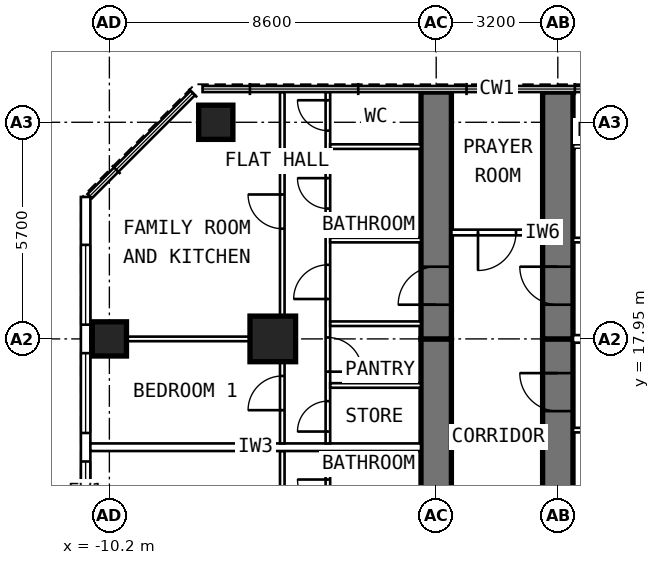
"""IFC4 building model, lengths in metres.
Left out: names, types, materials, properties, quantities, classifications, styles, units other than length and angle.
Written with IfcOpenShell. Run it as: python <this file> out.ifc"""

import sys

from ifc_helpers import new_model, si_unit, direction, frame, frame_2d, origin, origin_2d, place, context, subcontext, project, spatial, rectangle, extrude, element, fill, save


model = new_model("IFC4")
c1 = context("Model", 3, precision=1e-05, world=origin(), true_north=direction((0.0, 1.0)))
c2 = subcontext(c1, "Body", "Model", "MODEL_VIEW")
j1 = project(units=[si_unit("LENGTHUNIT", "METRE"), si_unit("PLANEANGLEUNIT", "RADIAN")], contexts=[c1])
p1 = place(None, origin())
s1 = spatial("IfcSite", under=j1, at=p1, CompositionType="ELEMENT")
p2 = place(p1, origin())
s2 = spatial("IfcBuilding", under=s1, at=p2, CompositionType="ELEMENT")
p3 = place(p2, frame((0.0, 0.0, 134.6)))
s3 = spatial("IfcBuildingStorey", under=s2, at=p3, CompositionType="ELEMENT", Elevation=134.6)
for number, where, z_axis, x_axis in (
    (1, (-10.2, 17.95, 0.0), (0.0, 0.0, 1.0), (0.0, 1.0, 0.0)),
    (2, (-7.4, 23.65, 0.0), (0.0, 0.0, 1.0), (0.0, 1.0, 0.0)),
):
    element("IfcColumn", number, at=place(p3, frame(where, z_axis=z_axis, x_axis=x_axis)), inside=s3, PredefinedType="COLUMN", context=c2, shape_type="SweptSolid", body=[
        extrude(rectangle(XDim=0.9, YDim=0.9, at=origin_2d()), origin(), (0.0, 0.0, 1.0), 3.6),
    ])
p4 = place(p3, frame((-5.9, 17.95, 0.0), z_axis=(0.0, 0.0, 1.0), x_axis=(0.0, 1.0, 0.0)))
e3 = element("IfcColumn", 3, at=p4, inside=s3, PredefinedType="COLUMN", context=c2, shape_type="SweptSolid", body=[
    extrude(rectangle(XDim=1.2, YDim=1.2, at=origin_2d()), origin(), (0.0, 0.0, 1.0), 3.6),
])
p5 = place(p3, frame((-1.6, 9.6, 0.0), z_axis=(0.0, 0.0, 1.0), x_axis=(0.0, 1.0, 0.0)))
e4 = element("IfcWall", 4, at=p5, inside=s3, PredefinedType="SHEAR", context=c2, shape_type="SweptSolid", body=[
    extrude(rectangle(XDim=8.35, YDim=0.8, at=frame_2d((4.175, 0.0))), origin(), (0.0, 0.0, 1.0), 3.6),
])
p6 = place(p5, frame((1.3, 0.0, 0.0)))
e5 = element("IfcOpeningElement", 5, at=p6, cuts=e4, PredefinedType="OPENING", context=c2, shape_type="SweptSolid", body=[
    extrude(rectangle(XDim=1.0, YDim=2.1, at=frame_2d((0.5, 1.05))), frame((0.0, 0.412, 0.0), z_axis=(0.0, -1.0, 0.0), x_axis=(1.0, 0.0, 0.0)), (0.0, 0.0, 1.0), 0.824),
])
p7 = place(p3, frame((-1.6, 17.95, 0.0), z_axis=(0.0, 0.0, 1.0), x_axis=(0.0, 1.0, 0.0)))
e6 = element("IfcWall", 6, at=p7, inside=s3, PredefinedType="SHEAR", context=c2, shape_type="SweptSolid", body=[
    extrude(rectangle(XDim=6.495, YDim=0.8, at=frame_2d((3.248, 0.0))), origin(), (0.0, 0.0, 1.0), 3.6),
])
p8 = place(p7, frame((0.9, 0.0, 0.0)))
e7 = element("IfcOpeningElement", 7, at=p8, cuts=e6, PredefinedType="OPENING", context=c2, shape_type="SweptSolid", body=[
    extrude(rectangle(XDim=1.0, YDim=2.1, at=frame_2d((0.5, 1.05))), frame((0.0, 0.412, 0.0), z_axis=(0.0, -1.0, 0.0), x_axis=(1.0, 0.0, 0.0)), (0.0, 0.0, 1.0), 0.824),
])
p9 = place(p3, frame((1.6, 9.6, 0.0), z_axis=(0.0, 0.0, 1.0), x_axis=(0.0, 1.0, 0.0)))
e8 = element("IfcWall", 8, at=p9, inside=s3, PredefinedType="SHEAR", context=c2, shape_type="SweptSolid", body=[
    extrude(rectangle(XDim=8.35, YDim=0.8, at=frame_2d((4.175, 0.0))), origin(), (0.0, 0.0, 1.0), 3.6),
])
p10 = place(p9, frame((6.45, 0.0, 0.0)))
e9 = element("IfcOpeningElement", 9, at=p10, cuts=e8, PredefinedType="OPENING", context=c2, shape_type="SweptSolid", body=[
    extrude(rectangle(XDim=1.0, YDim=2.1, at=frame_2d((0.5, 1.05))), frame((0.0, 0.412, 0.0), z_axis=(0.0, -1.0, 0.0), x_axis=(1.0, 0.0, 0.0)), (0.0, 0.0, 1.0), 0.824),
])
p11 = place(p3, frame((1.6, 17.95, 0.0), z_axis=(0.0, 0.0, 1.0), x_axis=(0.0, 1.0, 0.0)))
e10 = element("IfcWall", 10, at=p11, inside=s3, PredefinedType="SHEAR", context=c2, shape_type="SweptSolid", body=[
    extrude(rectangle(XDim=6.495, YDim=0.8, at=frame_2d((3.248, 0.0))), origin(), (0.0, 0.0, 1.0), 3.6),
])
p12 = place(p11, frame((0.9, 0.0, 0.0)))
e11 = element("IfcOpeningElement", 11, at=p12, cuts=e10, PredefinedType="OPENING", context=c2, shape_type="SweptSolid", body=[
    extrude(rectangle(XDim=1.0, YDim=2.1, at=frame_2d((0.5, 1.05))), frame((0.0, 0.412, 0.0), z_axis=(0.0, -1.0, 0.0), x_axis=(1.0, 0.0, 0.0)), (0.0, 0.0, 1.0), 0.824),
])
p13 = place(p3, frame((-10.825, 6.148, 0.0), z_axis=(0.0, 0.0, 1.0), x_axis=(0.0, 1.0, 0.0)))
e12 = element("IfcWall", 12, at=p13, inside=s3, PredefinedType="SOLIDWALL", context=c2, shape_type="SweptSolid", body=[
    extrude(rectangle(XDim=15.537, YDim=0.25, at=frame_2d((7.769, 0.0))), origin(), (0.0, 0.0, 1.0), 3.35),
])
p14 = place(p13, frame((0.777, 0.0, 0.8)))
e13 = element("IfcOpeningElement", 13, at=p14, cuts=e12, PredefinedType="OPENING", context=c2, shape_type="SweptSolid", body=[
    extrude(rectangle(XDim=2.1, YDim=1.8, at=frame_2d((1.05, 0.9))), frame((0.0, 0.137, 0.0), z_axis=(0.0, -1.0, 0.0), x_axis=(1.0, 0.0, 0.0)), (0.0, 0.0, 1.0), 0.274),
])
p15 = place(p13, frame((3.627, 0.0, 0.8)))
e14 = element("IfcOpeningElement", 14, at=p15, cuts=e12, PredefinedType="OPENING", context=c2, shape_type="SweptSolid", body=[
    extrude(rectangle(XDim=2.1, YDim=1.8, at=frame_2d((1.05, 0.9))), frame((0.0, 0.137, 0.0), z_axis=(0.0, -1.0, 0.0), x_axis=(1.0, 0.0, 0.0)), (0.0, 0.0, 1.0), 0.274),
])
p16 = place(p13, frame((6.477, 0.0, 0.8)))
e15 = element("IfcOpeningElement", 15, at=p16, cuts=e12, PredefinedType="OPENING", context=c2, shape_type="SweptSolid", body=[
    extrude(rectangle(XDim=2.1, YDim=1.8, at=frame_2d((1.05, 0.9))), frame((0.0, 0.137, 0.0), z_axis=(0.0, -1.0, 0.0), x_axis=(1.0, 0.0, 0.0)), (0.0, 0.0, 1.0), 0.274),
])
p17 = place(p13, frame((9.327, 0.0, 0.8)))
e16 = element("IfcOpeningElement", 16, at=p17, cuts=e12, PredefinedType="OPENING", context=c2, shape_type="SweptSolid", body=[
    extrude(rectangle(XDim=2.1, YDim=1.8, at=frame_2d((1.05, 0.9))), frame((0.0, 0.137, 0.0), z_axis=(0.0, -1.0, 0.0), x_axis=(1.0, 0.0, 0.0)), (0.0, 0.0, 1.0), 0.274),
])
p18 = place(p13, frame((12.177, 0.0, 0.8)))
e17 = element("IfcOpeningElement", 17, at=p18, cuts=e12, PredefinedType="OPENING", context=c2, shape_type="SweptSolid", body=[
    extrude(rectangle(XDim=2.1, YDim=1.8, at=frame_2d((1.05, 0.9))), frame((0.0, 0.137, 0.0), z_axis=(0.0, -1.0, 0.0), x_axis=(1.0, 0.0, 0.0)), (0.0, 0.0, 1.0), 0.274),
])
p19 = place(p3, frame((-4.45, 10.05, 0.0), z_axis=(0.0, 0.0, 1.0), x_axis=(0.0, 1.0, 0.0)))
e18 = element("IfcWall", 18, at=p19, inside=s3, PredefinedType="PARTITIONING", context=c2, shape_type="SweptSolid", body=[
    extrude(rectangle(XDim=4.95, YDim=0.12, at=frame_2d((2.475, 0.0))), origin(), (0.0, 0.0, 1.0), 3.35),
])
p20 = place(p19, frame((0.8, 0.0, 0.0)))
e19 = element("IfcOpeningElement", 19, at=p20, cuts=e18, PredefinedType="OPENING", context=c2, shape_type="SweptSolid", body=[
    extrude(rectangle(XDim=0.9, YDim=2.1, at=frame_2d((0.45, 1.05))), frame((0.0, 0.072, 0.0), z_axis=(0.0, -1.0, 0.0), x_axis=(1.0, 0.0, 0.0)), (0.0, 0.0, 1.0), 0.144),
])
p21 = place(p19, frame((3.4, 0.0, 0.0)))
e20 = element("IfcOpeningElement", 20, at=p21, cuts=e18, PredefinedType="OPENING", context=c2, shape_type="SweptSolid", body=[
    extrude(rectangle(XDim=0.8, YDim=2.1, at=frame_2d((0.4, 1.05))), frame((0.0, 0.072, 0.0), z_axis=(0.0, -1.0, 0.0), x_axis=(1.0, 0.0, 0.0)), (0.0, 0.0, 1.0), 0.144),
])
p22 = place(p3, frame((-5.65, 9.6, 0.0), z_axis=(0.0, 0.0, 1.0), x_axis=(0.0, 1.0, 0.0)))
e21 = element("IfcWall", 21, at=p22, inside=s3, PredefinedType="PARTITIONING", context=c2, shape_type="SweptSolid", body=[
    extrude(rectangle(XDim=5.4, YDim=0.12, at=frame_2d((2.7, 0.0))), origin(), (0.0, 0.0, 1.0), 3.35),
])
p23 = place(p22, frame((3.4, 0.0, 0.0)))
e22 = element("IfcOpeningElement", 22, at=p23, cuts=e21, PredefinedType="OPENING", context=c2, shape_type="SweptSolid", body=[
    extrude(rectangle(XDim=0.9, YDim=2.1, at=frame_2d((0.45, 1.05))), frame((0.0, 0.072, 0.0), z_axis=(0.0, -1.0, 0.0), x_axis=(1.0, 0.0, 0.0)), (0.0, 0.0, 1.0), 0.144),
])
p24 = place(p3, frame((-4.45, 15.2, 0.0), z_axis=(0.0, 0.0, 1.0), x_axis=(0.0, 1.0, 0.0)))
e23 = element("IfcWall", 23, at=p24, inside=s3, PredefinedType="PARTITIONING", context=c2, shape_type="SweptSolid", body=[
    extrude(rectangle(XDim=9.245, YDim=0.12, at=frame_2d((4.623, 0.0))), origin(), (0.0, 0.0, 1.0), 3.35),
])
p25 = place(p24, frame((0.312, 0.0, 0.0)))
e24 = element("IfcOpeningElement", 24, at=p25, cuts=e23, PredefinedType="OPENING", context=c2, shape_type="SweptSolid", body=[
    extrude(rectangle(XDim=0.8, YDim=2.1, at=frame_2d((0.4, 1.05))), frame((0.0, 0.072, 0.0), z_axis=(0.0, -1.0, 0.0), x_axis=(1.0, 0.0, 0.0)), (0.0, 0.0, 1.0), 0.144),
])
p26 = place(p24, frame((1.887, 0.0, 0.0)))
e25 = element("IfcOpeningElement", 25, at=p26, cuts=e23, PredefinedType="OPENING", context=c2, shape_type="SweptSolid", body=[
    extrude(rectangle(XDim=0.9, YDim=2.1, at=frame_2d((0.45, 1.05))), frame((0.0, 0.072, 0.0), z_axis=(0.0, -1.0, 0.0), x_axis=(1.0, 0.0, 0.0)), (0.0, 0.0, 1.0), 0.144),
])
p27 = place(p24, frame((3.8, 0.0, 0.0)))
e26 = element("IfcOpeningElement", 26, at=p27, cuts=e23, PredefinedType="OPENING", context=c2, shape_type="SweptSolid", body=[
    extrude(rectangle(XDim=0.9, YDim=2.1, at=frame_2d((0.45, 1.05))), frame((0.0, 0.072, 0.0), z_axis=(0.0, -1.0, 0.0), x_axis=(1.0, 0.0, 0.0)), (0.0, 0.0, 1.0), 0.144),
])
p28 = place(p24, frame((6.18, 0.0, 0.0)))
e27 = element("IfcOpeningElement", 27, at=p28, cuts=e23, PredefinedType="OPENING", context=c2, shape_type="SweptSolid", body=[
    extrude(rectangle(XDim=0.8, YDim=2.1, at=frame_2d((0.4, 1.05))), frame((0.0, 0.072, 0.0), z_axis=(0.0, -1.0, 0.0), x_axis=(1.0, 0.0, 0.0)), (0.0, 0.0, 1.0), 0.144),
])
p29 = place(p24, frame((8.23, 0.0, 0.0)))
e28 = element("IfcOpeningElement", 28, at=p29, cuts=e23, PredefinedType="OPENING", context=c2, shape_type="SweptSolid", body=[
    extrude(rectangle(XDim=0.8, YDim=2.1, at=frame_2d((0.4, 1.05))), frame((0.0, 0.072, 0.0), z_axis=(0.0, -1.0, 0.0), x_axis=(1.0, 0.0, 0.0)), (0.0, 0.0, 1.0), 0.144),
])
p30 = place(p3, frame((-5.65, 15.2, 0.0), z_axis=(0.0, 0.0, 1.0), x_axis=(0.0, 1.0, 0.0)))
e29 = element("IfcWall", 29, at=p30, inside=s3, PredefinedType="PARTITIONING", context=c2, shape_type="SweptSolid", body=[
    extrude(rectangle(XDim=9.245, YDim=0.12, at=frame_2d((4.623, 0.0))), origin(), (0.0, 0.0, 1.0), 3.35),
])
p31 = place(p30, frame((0.875, 0.0, 0.0)))
e30 = element("IfcOpeningElement", 30, at=p31, cuts=e29, PredefinedType="OPENING", context=c2, shape_type="SweptSolid", body=[
    extrude(rectangle(XDim=0.9, YDim=2.1, at=frame_2d((0.45, 1.05))), frame((0.0, 0.072, 0.0), z_axis=(0.0, -1.0, 0.0), x_axis=(1.0, 0.0, 0.0)), (0.0, 0.0, 1.0), 0.144),
])
p32 = place(p30, frame((5.65, 0.0, 0.0)))
e31 = element("IfcOpeningElement", 31, at=p32, cuts=e29, PredefinedType="OPENING", context=c2, shape_type="SweptSolid", body=[
    extrude(rectangle(XDim=0.9, YDim=2.1, at=frame_2d((0.45, 1.05))), frame((0.0, 0.072, 0.0), z_axis=(0.0, -1.0, 0.0), x_axis=(1.0, 0.0, 0.0)), (0.0, 0.0, 1.0), 0.144),
])
p33 = place(p3, frame((-5.71, 17.95, 0.0), z_axis=(0.0, 0.0, 1.0), x_axis=(-1.0, 0.0, 0.0)))
e32 = element("IfcWall", 32, at=p33, inside=s3, PredefinedType="PARTITIONING", context=c2, shape_type="SweptSolid", body=[
    extrude(rectangle(XDim=4.99, YDim=0.12, at=frame_2d((2.495, 0.0))), origin(), (0.0, 0.0, 1.0), 2.45),
])
for number, where, z_axis, x_axis in (
    (33, (-2.0, 16.725, 0.0), (0.0, 0.0, 1.0), (-1.0, 0.0, 0.0)),
    (34, (-2.0, 18.35, 0.0), (0.0, 0.0, 1.0), (-1.0, 0.0, 0.0)),
    (35, (-2.0, 20.55, 0.0), (0.0, 0.0, 1.0), (-1.0, 0.0, 0.0)),
    (36, (-2.0, 23.01, 0.0), (0.0, 0.0, 1.0), (-1.0, 0.0, 0.0)),
):
    element("IfcWall", number, at=place(p3, frame(where, z_axis=z_axis, x_axis=x_axis)), inside=s3, PredefinedType="PARTITIONING", context=c2, shape_type="SweptSolid", body=[
        extrude(rectangle(XDim=2.39, YDim=0.12, at=frame_2d((1.195, 0.0))), origin(), (0.0, 0.0, 1.0), 3.35),
    ])
p34 = place(p3, frame((-2.0, 15.1, 0.0), z_axis=(0.0, 0.0, 1.0), x_axis=(-1.0, 0.0, 0.0)))
e37 = element("IfcWall", 37, at=p34, inside=s3, PredefinedType="PARTITIONING", context=c2, shape_type="SweptSolid", body=[
    extrude(rectangle(XDim=8.7, YDim=0.2, at=frame_2d((4.35, 0.0))), origin(), (0.0, 0.0, 1.0), 3.35),
])
for number, where, z_axis, x_axis in (
    (38, (2.0, 15.55, 0.0), (0.0, 0.0, 1.0), (1.0, 0.0, 0.0)),
    (39, (2.0, 20.55, 0.0), (0.0, 0.0, 1.0), (1.0, 0.0, 0.0)),
    (40, (2.0, 23.01, 0.0), (0.0, 0.0, 1.0), (1.0, 0.0, 0.0)),
):
    element("IfcWall", number, at=place(p3, frame(where, z_axis=z_axis, x_axis=x_axis)), inside=s3, PredefinedType="PARTITIONING", context=c2, shape_type="SweptSolid", body=[
        extrude(rectangle(XDim=2.39, YDim=0.12, at=frame_2d((1.195, 0.0))), origin(), (0.0, 0.0, 1.0), 3.35),
    ])
p35 = place(p3, frame((2.0, 17.95, 0.0), z_axis=(0.0, 0.0, 1.0), x_axis=(1.0, 0.0, 0.0)))
e41 = element("IfcWall", 41, at=p35, inside=s3, PredefinedType="PARTITIONING", context=c2, shape_type="SweptSolid", body=[
    extrude(rectangle(XDim=8.7, YDim=0.2, at=frame_2d((4.35, 0.0))), origin(), (0.0, 0.0, 1.0), 2.45),
])
p36 = place(p3, frame((1.2, 20.75, 0.0), z_axis=(0.0, 0.0, 1.0), x_axis=(-1.0, 0.0, 0.0)))
e42 = element("IfcWall", 42, at=p36, inside=s3, PredefinedType="PARTITIONING", context=c2, shape_type="SweptSolid", body=[
    extrude(rectangle(XDim=2.4, YDim=0.15, at=frame_2d((1.2, 0.0))), origin(), (0.0, 0.0, 1.0), 3.35),
])
p37 = place(p36, frame((0.7, 0.0, 0.0)))
e43 = element("IfcOpeningElement", 43, at=p37, cuts=e42, PredefinedType="OPENING", context=c2, shape_type="SweptSolid", body=[
    extrude(rectangle(XDim=1.0, YDim=2.1, at=frame_2d((0.5, 1.05))), frame((0.0, 0.087, 0.0), z_axis=(0.0, -1.0, 0.0), x_axis=(1.0, 0.0, 0.0)), (0.0, 0.0, 1.0), 0.174),
])
p38 = place(p16, origin())
e44 = element("IfcWindow", 44, at=p38, inside=s3, PartitioningType="SINGLE_PANEL", PredefinedType="WINDOW", context=c2, shape_type="SweptSolid", body=[
    extrude(rectangle(XDim=2.1, YDim=1.8, at=frame_2d((1.05, 0.9))), frame((0.0, 0.03, 0.0), z_axis=(0.0, -1.0, 0.0), x_axis=(1.0, 0.0, 0.0)), (0.0, 0.0, 1.0), 0.06),
])
fill(e15, e44)
p39 = place(p17, origin())
e45 = element("IfcWindow", 45, at=p39, inside=s3, PartitioningType="SINGLE_PANEL", PredefinedType="WINDOW", context=c2, shape_type="SweptSolid", body=[
    extrude(rectangle(XDim=2.1, YDim=1.8, at=frame_2d((1.05, 0.9))), frame((0.0, 0.03, 0.0), z_axis=(0.0, -1.0, 0.0), x_axis=(1.0, 0.0, 0.0)), (0.0, 0.0, 1.0), 0.06),
])
fill(e16, e45)
p40 = place(p18, origin())
e46 = element("IfcWindow", 46, at=p40, inside=s3, PartitioningType="SINGLE_PANEL", PredefinedType="WINDOW", context=c2, shape_type="SweptSolid", body=[
    extrude(rectangle(XDim=2.1, YDim=1.8, at=frame_2d((1.05, 0.9))), frame((0.0, 0.03, 0.0), z_axis=(0.0, -1.0, 0.0), x_axis=(1.0, 0.0, 0.0)), (0.0, 0.0, 1.0), 0.06),
])
fill(e17, e46)
p41 = place(p21, origin())
e47 = element("IfcDoor", 47, at=p41, inside=s3, OperationType="SINGLE_SWING_RIGHT", PredefinedType="DOOR", context=c2, shape_type="SweptSolid", body=[
    extrude(rectangle(XDim=0.8, YDim=2.1, at=frame_2d((0.4, 1.05))), frame((0.0, 0.025, 0.0), z_axis=(0.0, -1.0, 0.0), x_axis=(1.0, 0.0, 0.0)), (0.0, 0.0, 1.0), 0.05),
])
fill(e20, e47)
p42 = place(p8, origin())
e48 = element("IfcDoor", 48, at=p42, inside=s3, OperationType="SINGLE_SWING_LEFT", PredefinedType="DOOR", context=c2, shape_type="SweptSolid", body=[
    extrude(rectangle(XDim=1.0, YDim=2.1, at=frame_2d((0.5, 1.05))), frame((0.0, 0.15, 0.0), z_axis=(0.0, -1.0, 0.0), x_axis=(1.0, 0.0, 0.0)), (0.0, 0.0, 1.0), 0.3),
])
fill(e7, e48)
p43 = place(p31, origin())
e49 = element("IfcDoor", 49, at=p43, inside=s3, OperationType="SINGLE_SWING_LEFT", PredefinedType="DOOR", context=c2, shape_type="SweptSolid", body=[
    extrude(rectangle(XDim=0.9, YDim=2.1, at=frame_2d((0.45, 1.05))), frame((0.0, 0.025, 0.0), z_axis=(0.0, -1.0, 0.0), x_axis=(1.0, 0.0, 0.0)), (0.0, 0.0, 1.0), 0.05),
])
fill(e30, e49)
p44 = place(p32, origin())
e50 = element("IfcDoor", 50, at=p44, inside=s3, OperationType="SINGLE_SWING_RIGHT", PredefinedType="DOOR", context=c2, shape_type="SweptSolid", body=[
    extrude(rectangle(XDim=0.9, YDim=2.1, at=frame_2d((0.45, 1.05))), frame((0.0, 0.025, 0.0), z_axis=(0.0, -1.0, 0.0), x_axis=(1.0, 0.0, 0.0)), (0.0, 0.0, 1.0), 0.05),
])
fill(e31, e50)
p45 = place(p25, origin())
e51 = element("IfcDoor", 51, at=p45, inside=s3, OperationType="SINGLE_SWING_LEFT", PredefinedType="DOOR", context=c2, shape_type="SweptSolid", body=[
    extrude(rectangle(XDim=0.8, YDim=2.1, at=frame_2d((0.4, 1.05))), frame((0.0, 0.025, 0.0), z_axis=(0.0, -1.0, 0.0), x_axis=(1.0, 0.0, 0.0)), (0.0, 0.0, 1.0), 0.05),
])
fill(e24, e51)
p46 = place(p26, frame((0.9, 0.0, 0.0), z_axis=(0.0, 0.0, 1.0), x_axis=(-1.0, 0.0, 0.0)))
e52 = element("IfcDoor", 52, at=p46, inside=s3, OperationType="SINGLE_SWING_RIGHT", PredefinedType="DOOR", context=c2, shape_type="SweptSolid", body=[
    extrude(rectangle(XDim=0.9, YDim=2.1, at=frame_2d((0.45, 1.05))), frame((0.0, 0.025, 0.0), z_axis=(0.0, -1.0, 0.0), x_axis=(1.0, 0.0, 0.0)), (0.0, 0.0, 1.0), 0.05),
])
fill(e25, e52)
p47 = place(p27, origin())
e53 = element("IfcDoor", 53, at=p47, inside=s3, OperationType="SINGLE_SWING_LEFT", PredefinedType="DOOR", context=c2, shape_type="SweptSolid", body=[
    extrude(rectangle(XDim=0.9, YDim=2.1, at=frame_2d((0.45, 1.05))), frame((0.0, 0.025, 0.0), z_axis=(0.0, -1.0, 0.0), x_axis=(1.0, 0.0, 0.0)), (0.0, 0.0, 1.0), 0.05),
])
fill(e26, e53)
p48 = place(p28, origin())
e54 = element("IfcDoor", 54, at=p48, inside=s3, OperationType="SINGLE_SWING_RIGHT", PredefinedType="DOOR", context=c2, shape_type="SweptSolid", body=[
    extrude(rectangle(XDim=0.8, YDim=2.1, at=frame_2d((0.4, 1.05))), frame((0.0, 0.025, 0.0), z_axis=(0.0, -1.0, 0.0), x_axis=(1.0, 0.0, 0.0)), (0.0, 0.0, 1.0), 0.05),
])
fill(e27, e54)
p49 = place(p29, origin())
e55 = element("IfcDoor", 55, at=p49, inside=s3, OperationType="SINGLE_SWING_RIGHT", PredefinedType="DOOR", context=c2, shape_type="SweptSolid", body=[
    extrude(rectangle(XDim=0.8, YDim=2.1, at=frame_2d((0.4, 1.05))), frame((0.0, 0.025, 0.0), z_axis=(0.0, -1.0, 0.0), x_axis=(1.0, 0.0, 0.0)), (0.0, 0.0, 1.0), 0.05),
])
fill(e28, e55)
p50 = place(p10, origin())
e56 = element("IfcDoor", 56, at=p50, inside=s3, OperationType="SINGLE_SWING_RIGHT", PredefinedType="DOOR", context=c2, shape_type="SweptSolid", body=[
    extrude(rectangle(XDim=1.0, YDim=2.1, at=frame_2d((0.5, 1.05))), frame((0.0, 0.15, 0.0), z_axis=(0.0, -1.0, 0.0), x_axis=(1.0, 0.0, 0.0)), (0.0, 0.0, 1.0), 0.3),
])
fill(e9, e56)
p51 = place(p12, origin())
e57 = element("IfcDoor", 57, at=p51, inside=s3, OperationType="SINGLE_SWING_RIGHT", PredefinedType="DOOR", context=c2, shape_type="SweptSolid", body=[
    extrude(rectangle(XDim=1.0, YDim=2.1, at=frame_2d((0.5, 1.05))), frame((0.0, 0.15, 0.0), z_axis=(0.0, -1.0, 0.0), x_axis=(1.0, 0.0, 0.0)), (0.0, 0.0, 1.0), 0.3),
])
fill(e11, e57)
p52 = place(p37, origin())
e58 = element("IfcDoor", 58, at=p52, inside=s3, OperationType="SINGLE_SWING_RIGHT", PredefinedType="DOOR", context=c2, shape_type="SweptSolid", body=[
    extrude(rectangle(XDim=1.0, YDim=2.1, at=frame_2d((0.5, 1.05))), frame((0.0, 0.025, 0.0), z_axis=(0.0, -1.0, 0.0), x_axis=(1.0, 0.0, 0.0)), (0.0, 0.0, 1.0), 0.05),
])
fill(e43, e58)
save(model, sys.argv[1])
